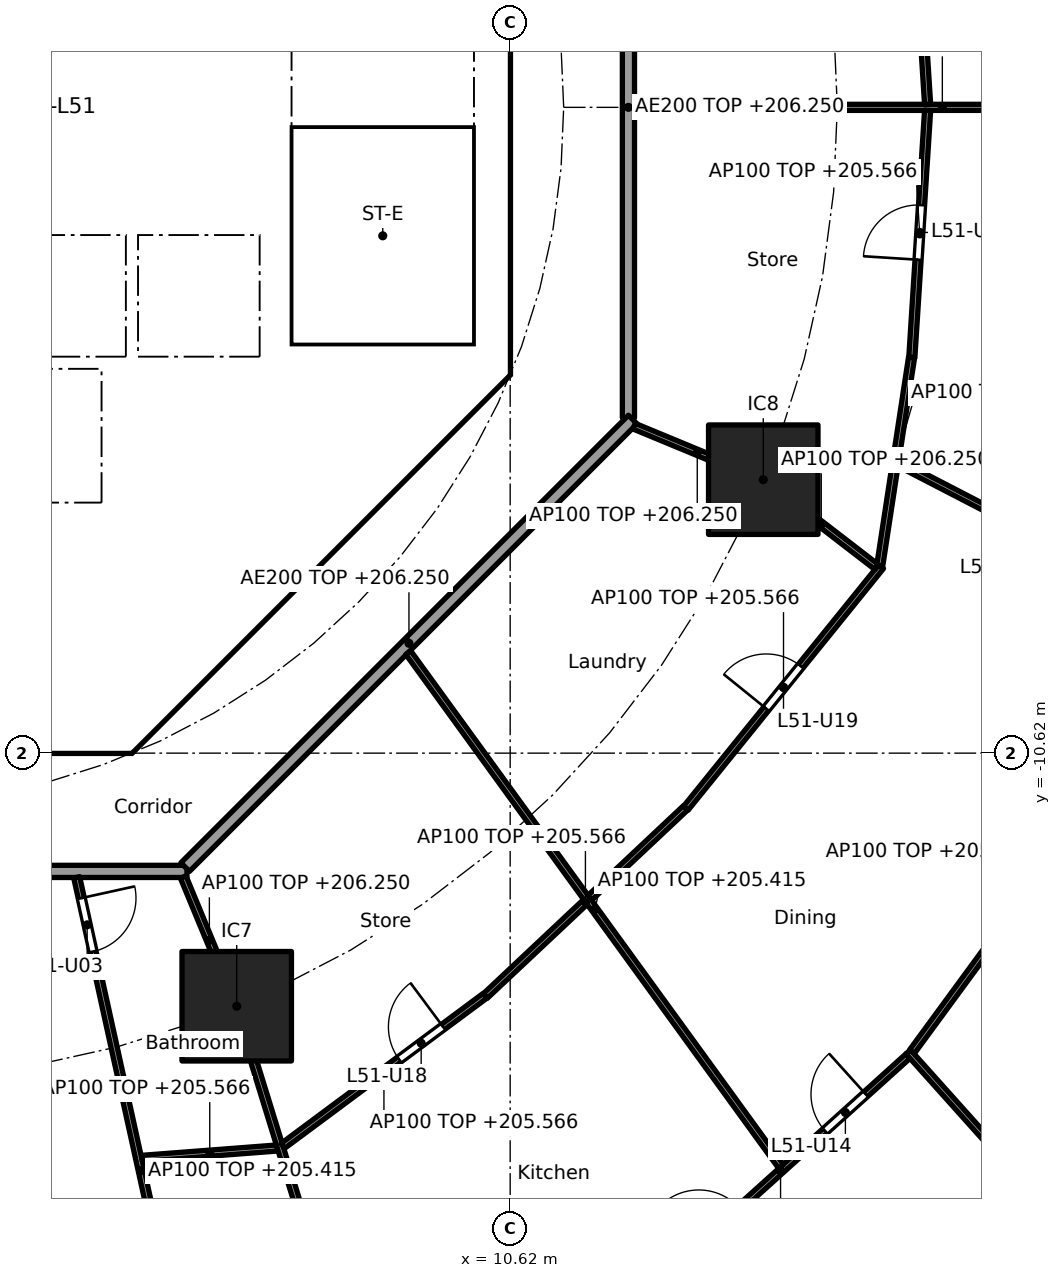
"""IFC4 building model, lengths in metres.
Left out: names, types, materials, properties, quantities, classifications, styles, units other than length and angle.
Written with IfcOpenShell. Run it as: python <this file> out.ifc"""

import sys

from ifc_helpers import new_model, si_unit, direction, frame, frame_2d, origin, origin_2d, place, context, subcontext, project, spatial, polyline, rectangle, outline, extrude, element, fill, save


model = new_model("IFC4")
c1 = context("Model", 3, precision=1e-05, world=origin(), true_north=direction((0.0, 1.0)))
c2 = subcontext(c1, "Body", "Model", "MODEL_VIEW")
j1 = project(units=[si_unit("LENGTHUNIT", "METRE"), si_unit("PLANEANGLEUNIT", "RADIAN")], contexts=[c1])
p1 = place(None, origin())
s1 = spatial("IfcSite", under=j1, at=p1, CompositionType="ELEMENT")
p2 = place(p1, origin())
s2 = spatial("IfcBuilding", under=s1, at=p2, CompositionType="ELEMENT")
p3 = place(p2, frame((0.0, 0.0, 202.9)))
s3 = spatial("IfcBuildingStorey", under=s2, at=p3, CompositionType="ELEMENT", Elevation=202.9)
for number, where, z_axis, x_axis in (
    (1, (6.123, -14.782, 0.0), (0.0, 0.0, 1.0), (1.0, 0.0, 0.0)),
    (2, (14.782, -6.123, 0.0), (0.0, 0.0, 1.0), (1.0, 0.0, 0.0)),
):
    element("IfcColumn", number, at=place(p3, frame(where, z_axis=z_axis, x_axis=x_axis)), inside=s3, PredefinedType="COLUMN", context=c2, shape_type="SweptSolid", body=[
        extrude(rectangle(XDim=1.8, YDim=1.8, at=origin_2d()), origin(), (0.0, 0.0, 1.0), 3.7),
    ])
p4 = place(p3, frame((4.613, -9.988, 0.0), z_axis=(0.0, 0.0, 1.0), x_axis=(0.707106781187, 0.707106781187, 0.0)))
e3 = element("IfcWall", 3, at=p4, inside=s3, PredefinedType="SHEAR", context=c2, shape_type="SweptSolid", body=[
    extrude(rectangle(XDim=7.602, YDim=0.6, at=frame_2d((3.801, 0.0))), origin(), (0.0, 0.0, 1.0), 3.35),
])
p5 = place(p4, frame((3.201, 0.0, 0.0)))
e4 = element("IfcOpeningElement", 4, at=p5, cuts=e3, PredefinedType="OPENING", context=c2, shape_type="SweptSolid", body=[
    extrude(rectangle(XDim=1.2, YDim=2.1, at=frame_2d((0.6, 1.05))), frame((0.0, 0.31, 0.0), z_axis=(0.0, -1.0, 0.0), x_axis=(1.0, 0.0, 0.0)), (0.0, 0.0, 1.0), 0.62),
])
p6 = place(p3, frame((4.0, -10.025, 0.0), z_axis=(0.0, 0.0, 1.0), x_axis=(0.0, 1.0, 0.0)))
e5 = element("IfcWall", 5, at=p6, inside=s3, PredefinedType="SOLIDWALL", context=c2, shape_type="SweptSolid", body=[
    extrude(rectangle(XDim=3.0, YDim=0.2, at=frame_2d((1.5, 0.0))), origin(), (0.0, 0.0, 1.0), 3.35),
])
p7 = place(p6, frame((0.975, 0.0, 0.0)))
e6 = element("IfcOpeningElement", 6, at=p7, cuts=e5, PredefinedType="OPENING", context=c2, shape_type="SweptSolid", body=[
    extrude(rectangle(XDim=1.1, YDim=2.1, at=frame_2d((0.55, 1.05))), frame((0.0, 0.11, 0.0), z_axis=(0.0, -1.0, 0.0), x_axis=(1.0, 0.0, 0.0)), (0.0, 0.0, 1.0), 0.22),
])
p8 = place(p3, frame((4.0, -6.5, 0.0), z_axis=(0.0, 0.0, 1.0), x_axis=(0.0, 1.0, 0.0)))
e7 = element("IfcWall", 7, at=p8, inside=s3, PredefinedType="SOLIDWALL", context=c2, shape_type="SweptSolid", body=[
    extrude(rectangle(XDim=2.2, YDim=0.2, at=frame_2d((1.1, 0.0))), origin(), (0.0, 0.0, 1.0), 3.35),
])
p9 = place(p8, frame((0.55, 0.0, 0.0)))
e8 = element("IfcOpeningElement", 8, at=p9, cuts=e7, PredefinedType="OPENING", context=c2, shape_type="SweptSolid", body=[
    extrude(rectangle(XDim=1.1, YDim=2.1, at=frame_2d((0.55, 1.05))), frame((0.0, 0.11, 0.0), z_axis=(0.0, -1.0, 0.0), x_axis=(1.0, 0.0, 0.0)), (0.0, 0.0, 1.0), 0.22),
])
p10 = place(p3, frame((-6.7, -2.0, 0.0), z_axis=(0.0, 0.0, 1.0), x_axis=(1.0, 0.0, 0.0)))
e9 = element("IfcWall", 9, at=p10, inside=s3, PredefinedType="SOLIDWALL", context=c2, shape_type="SweptSolid", body=[
    extrude(rectangle(XDim=13.4, YDim=0.2, at=frame_2d((6.7, 0.0))), origin(), (0.0, 0.0, 1.0), 3.35),
])
p11 = place(p10, frame((5.05, 0.0, 0.0)))
e10 = element("IfcOpeningElement", 10, at=p11, cuts=e9, PredefinedType="OPENING", context=c2, shape_type="SweptSolid", body=[
    extrude(rectangle(XDim=1.1, YDim=2.1, at=frame_2d((0.55, 1.05))), frame((0.0, 0.11, 0.0), z_axis=(0.0, -1.0, 0.0), x_axis=(1.0, 0.0, 0.0)), (0.0, 0.0, 1.0), 0.22),
])
p12 = place(p10, frame((7.25, 0.0, 0.0)))
e11 = element("IfcOpeningElement", 11, at=p12, cuts=e9, PredefinedType="OPENING", context=c2, shape_type="SweptSolid", body=[
    extrude(rectangle(XDim=1.1, YDim=2.1, at=frame_2d((0.55, 1.05))), frame((0.0, 0.11, 0.0), z_axis=(0.0, -1.0, 0.0), x_axis=(1.0, 0.0, 0.0)), (0.0, 0.0, 1.0), 0.22),
])
p13 = place(p10, frame((0.75, 0.0, 0.0)))
e12 = element("IfcOpeningElement", 12, at=p13, cuts=e9, PredefinedType="OPENING", context=c2, shape_type="SweptSolid", body=[
    extrude(rectangle(XDim=0.9, YDim=2.1, at=frame_2d((0.45, 1.05))), frame((0.0, 0.11, 0.0), z_axis=(0.0, -1.0, 0.0), x_axis=(1.0, 0.0, 0.0)), (0.0, 0.0, 1.0), 0.22),
])
p14 = place(p10, frame((2.95, 0.0, 0.0)))
e13 = element("IfcOpeningElement", 13, at=p14, cuts=e9, PredefinedType="OPENING", context=c2, shape_type="SweptSolid", body=[
    extrude(rectangle(XDim=0.9, YDim=2.1, at=frame_2d((0.45, 1.05))), frame((0.0, 0.11, 0.0), z_axis=(0.0, -1.0, 0.0), x_axis=(1.0, 0.0, 0.0)), (0.0, 0.0, 1.0), 0.22),
])
p15 = place(p3, origin())
e14 = element("IfcWall", 14, at=p15, inside=s3, PredefinedType="SHEAR", context=c2, shape_type="SweptSolid", body=[
    extrude(outline(polyline([(-4.152, -10.025), (4.152, -10.025), (4.401, -9.776), (4.825, -10.2), (4.401, -10.625), (-4.401, -10.625), (-4.825, -10.2), (-4.401, -9.776), (-4.152, -10.025)])), origin(), (0.0, 0.0, 1.0), 3.35),
])
p16 = place(p3, origin())
e15 = element("IfcWall", 15, at=p16, inside=s3, PredefinedType="SHEAR", context=c2, shape_type="SweptSolid", body=[
    extrude(outline(polyline([(9.776, -4.401), (10.025, -4.152), (10.025, -3.801), (10.025, 4.152), (9.776, 4.401), (10.2, 4.825), (10.625, 4.401), (10.625, -4.401), (10.2, -4.825), (9.776, -4.401)])), origin(), (0.0, 0.0, 1.0), 3.35),
])
p17 = place(p3, origin())
e16 = element("IfcWall", 16, at=p17, inside=s3, PredefinedType="SOLIDWALL", context=c2, shape_type="SweptSolid", body=[
    extrude(outline(polyline([(-6.7, -2.1), (-6.5, -2.1), (-6.5, -4.1), (-4.5, -4.1), (-4.5, -2.1), (-4.3, -2.1), (-4.3, -4.1), (-2.3, -4.1), (-2.3, -2.1), (-2.1, -2.1), (-2.1, -4.1), (-0.1, -4.1), (-0.1, -2.1), (0.1, -2.1), (0.1, -4.1), (2.1, -4.1), (2.1, -2.1), (2.3, -2.1), (2.3, -4.1), (4.3, -4.1), (4.3, -2.1), (4.5, -2.1), (4.5, -4.1), (6.5, -4.1), (6.5, -2.1), (6.7, -2.1), (6.7, -4.3), (-6.7, -4.3), (-6.7, -2.1)])), origin(), (0.0, 0.0, 1.0), 3.35),
])
p18 = place(p3, origin())
e17 = element("IfcWall", 17, at=p18, inside=s3, PredefinedType="SOLIDWALL", context=c2, shape_type="SweptSolid", body=[
    extrude(outline(polyline([(4.1, -7.025), (-4.1, -7.025), (-4.1, -6.5), (4.1, -6.5), (4.1, -7.025)])), origin(), (0.0, 0.0, 1.0), 3.35),
])
p19 = place(p3, origin())
e18 = element("IfcWall", 18, at=p19, inside=s3, PredefinedType="SOLIDWALL", context=c2, shape_type="SweptSolid", body=[
    extrude(outline(polyline([(7.025, -3.9), (6.7, -3.9), (6.7, 3.9), (7.025, 3.9), (7.025, -3.9)])), origin(), (0.0, 0.0, 1.0), 3.35),
])
p20 = place(p3, origin())
e19 = element("IfcWall", 19, at=p20, inside=s3, PredefinedType="SOLIDWALL", context=c2, shape_type="SweptSolid", body=[
    extrude(outline(polyline([(10.025, -4.1), (6.7, -4.1), (6.7, -3.9), (10.025, -3.9), (10.025, -4.1)])), origin(), (0.0, 0.0, 1.0), 3.35),
])
p21 = place(p3, frame((12.565, -5.104, 0.0), z_axis=(0.0, 0.0, 1.0), x_axis=(0.0, 1.0, 0.0)))
e20 = element("IfcWall", 20, at=p21, inside=s3, PredefinedType="PARTITIONING", context=c2, shape_type="SweptSolid", body=[
    extrude(rectangle(XDim=10.209, YDim=0.2, at=frame_2d((5.104, 0.0))), origin(), (0.0, 0.0, 1.0), 3.35),
])
p22 = place(p3, frame((-5.104, -12.565, 0.0), z_axis=(0.0, 0.0, 1.0), x_axis=(1.0, 0.0, 0.0)))
e21 = element("IfcWall", 21, at=p22, inside=s3, PredefinedType="PARTITIONING", context=c2, shape_type="SweptSolid", body=[
    extrude(rectangle(XDim=10.409, YDim=0.2, at=frame_2d((5.205, 0.0))), origin(), (0.0, 0.0, 1.0), 3.35),
])
p23 = place(p22, frame((6.339, 0.0, 0.0)))
e22 = element("IfcOpeningElement", 22, at=p23, cuts=e21, PredefinedType="OPENING", context=c2, shape_type="SweptSolid", body=[
    extrude(rectangle(XDim=1.0, YDim=2.1, at=frame_2d((0.5, 1.05))), frame((0.0, 0.11, 0.0), z_axis=(0.0, -1.0, 0.0), x_axis=(1.0, 0.0, 0.0)), (0.0, 0.0, 1.0), 0.22),
])
p24 = place(p3, frame((5.275, -12.494, 0.0), z_axis=(0.0, 0.0, 1.0), x_axis=(0.707106781187, 0.707106781187, 0.0)))
e23 = element("IfcWall", 23, at=p24, inside=s3, PredefinedType="PARTITIONING", context=c2, shape_type="SweptSolid", body=[
    extrude(rectangle(XDim=10.409, YDim=0.2, at=frame_2d((5.205, 0.0))), origin(), (0.0, 0.0, 1.0), 3.35),
])
p25 = place(p3, frame((12.665, 0.0, 0.0), z_axis=(0.0, 0.0, 1.0), x_axis=(1.0, 0.0, 0.0)))
e24 = element("IfcWall", 24, at=p25, inside=s3, PredefinedType="PARTITIONING", context=c2, shape_type="SweptSolid", body=[
    extrude(rectangle(XDim=10.124, YDim=0.1, at=frame_2d((5.062, 0.0))), origin(), (0.0, 0.0, 1.0), 2.515),
])
p26 = place(p3, frame((17.485, 0.05, 0.0), z_axis=(0.0, 0.0, 1.0), x_axis=(-0.063673473968, 0.997970785501, 0.0)))
e25 = element("IfcWall", 25, at=p26, inside=s3, PredefinedType="PARTITIONING", context=c2, shape_type="SweptSolid", body=[
    extrude(rectangle(XDim=4.072, YDim=0.1, at=frame_2d((2.036, 0.0))), origin(), (0.0, 0.0, 1.0), 2.666),
])
p27 = place(p26, frame((1.561, 0.0, 0.0)))
e26 = element("IfcOpeningElement", 26, at=p27, cuts=e25, PredefinedType="OPENING", context=c2, shape_type="SweptSolid", body=[
    extrude(rectangle(XDim=0.9, YDim=2.1, at=frame_2d((0.45, 1.05))), frame((0.0, 0.06, 0.0), z_axis=(0.0, -1.0, 0.0), x_axis=(1.0, 0.0, 0.0)), (0.0, 0.0, 1.0), 0.12),
])
p28 = place(p3, frame((17.485, -0.05, 0.0), z_axis=(0.0, 0.0, 1.0), x_axis=(-0.063673473968, -0.997970785501, 0.0)))
e27 = element("IfcWall", 27, at=p28, inside=s3, PredefinedType="PARTITIONING", context=c2, shape_type="SweptSolid", body=[
    extrude(rectangle(XDim=4.072, YDim=0.1, at=frame_2d((2.036, 0.0))), origin(), (0.0, 0.0, 1.0), 2.666),
])
p29 = place(p28, frame((1.561, 0.0, 0.0)))
e28 = element("IfcOpeningElement", 28, at=p29, cuts=e27, PredefinedType="OPENING", context=c2, shape_type="SweptSolid", body=[
    extrude(rectangle(XDim=0.9, YDim=2.1, at=frame_2d((0.45, 1.05))), frame((0.0, 0.06, 0.0), z_axis=(0.0, -1.0, 0.0), x_axis=(1.0, 0.0, 0.0)), (0.0, 0.0, 1.0), 0.12),
])
p30 = place(p3, frame((3.491, -12.662, 0.0), z_axis=(0.0, 0.0, 1.0), x_axis=(0.215082442833, -0.976595895335, 0.0)))
e29 = element("IfcWall", 29, at=p30, inside=s3, PredefinedType="PARTITIONING", context=c2, shape_type="SweptSolid", body=[
    extrude(rectangle(XDim=9.878, YDim=0.1, at=frame_2d((4.939, 0.0))), origin(), (0.0, 0.0, 1.0), 2.515),
])
p31 = place(p30, frame((0.35, 0.0, 0.0)))
e30 = element("IfcOpeningElement", 30, at=p31, cuts=e29, PredefinedType="OPENING", context=c2, shape_type="SweptSolid", body=[
    extrude(rectangle(XDim=0.9, YDim=2.1, at=frame_2d((0.45, 1.05))), frame((0.0, 0.06, 0.0), z_axis=(0.0, -1.0, 0.0), x_axis=(1.0, 0.0, 0.0)), (0.0, 0.0, 1.0), 0.12),
])
p32 = place(p30, frame((6.861, 0.0, 0.0)))
e31 = element("IfcOpeningElement", 31, at=p32, cuts=e29, PredefinedType="OPENING", context=c2, shape_type="SweptSolid", body=[
    extrude(rectangle(XDim=0.9, YDim=2.1, at=frame_2d((0.45, 1.05))), frame((0.0, 0.06, 0.0), z_axis=(0.0, -1.0, 0.0), x_axis=(1.0, 0.0, 0.0)), (0.0, 0.0, 1.0), 0.12),
])
p33 = place(p3, frame((4.568, -17.284, 0.0), z_axis=(0.0, 0.0, 1.0), x_axis=(0.997076339393, 0.076411867029, 0.0)))
e32 = element("IfcWall", 32, at=p33, inside=s3, PredefinedType="PARTITIONING", context=c2, shape_type="SweptSolid", body=[
    extrude(rectangle(XDim=2.23, YDim=0.1, at=frame_2d((1.115, 0.0))), origin(), (0.0, 0.0, 1.0), 2.666),
])
p34 = place(p3, frame((5.243, -12.657, 0.0), z_axis=(0.0, 0.0, 1.0), x_axis=(0.382719158442, -0.923864733477, 0.0)))
e33 = element("IfcWall", 33, at=p34, inside=s3, PredefinedType="PARTITIONING", context=c2, shape_type="SweptSolid", body=[
    extrude(rectangle(XDim=2.25, YDim=0.1, at=frame_2d((1.125, 0.0))), origin(), (0.0, 0.0, 1.0), 3.35),
])
p35 = place(p3, frame((6.138, -14.83, 0.0), z_axis=(0.0, 0.0, 1.0), x_axis=(0.294822274121, -0.955552105687, 0.0)))
e34 = element("IfcWall", 34, at=p35, inside=s3, PredefinedType="PARTITIONING", context=c2, shape_type="SweptSolid", body=[
    extrude(rectangle(XDim=7.594, YDim=0.1, at=frame_2d((3.797, 0.0))), origin(), (0.0, 0.0, 1.0), 3.35),
])
p36 = place(p3, frame((6.881, -17.08, 0.0), z_axis=(0.0, 0.0, 1.0), x_axis=(0.802784956441, 0.596268659005, 0.0)))
e35 = element("IfcWall", 35, at=p36, inside=s3, PredefinedType="PARTITIONING", context=c2, shape_type="SweptSolid", body=[
    extrude(rectangle(XDim=4.142, YDim=0.1, at=frame_2d((2.071, 0.0))), origin(), (0.0, 0.0, 1.0), 2.666),
])
p37 = place(p36, frame((2.384, 0.0, 0.0)))
e36 = element("IfcOpeningElement", 36, at=p37, cuts=e35, PredefinedType="OPENING", context=c2, shape_type="SweptSolid", body=[
    extrude(rectangle(XDim=0.9, YDim=2.1, at=frame_2d((0.45, 1.05))), frame((0.0, 0.06, 0.0), z_axis=(0.0, -1.0, 0.0), x_axis=(1.0, 0.0, 0.0)), (0.0, 0.0, 1.0), 0.12),
])
p38 = place(p3, frame((10.21, -14.614, 0.0), z_axis=(0.0, 0.0, 1.0), x_axis=(0.728883199496, 0.684638066055, 0.0)))
e37 = element("IfcWall", 37, at=p38, inside=s3, PredefinedType="PARTITIONING", context=c2, shape_type="SweptSolid", body=[
    extrude(rectangle(XDim=4.519, YDim=0.1, at=frame_2d((2.26, 0.0))), origin(), (0.0, 0.0, 1.0), 2.666),
])
p39 = place(p3, frame((12.971, -19.38, 0.0), z_axis=(0.0, 0.0, 1.0), x_axis=(0.742768881471, 0.669547898748, 0.0)))
e38 = element("IfcWall", 38, at=p39, inside=s3, PredefinedType="PARTITIONING", context=c2, shape_type="SweptSolid", body=[
    extrude(rectangle(XDim=5.642, YDim=0.1, at=frame_2d((2.821, 0.0))), origin(), (0.0, 0.0, 1.0), 2.666),
])
p40 = place(p39, frame((1.01, 0.0, 0.0)))
e39 = element("IfcOpeningElement", 39, at=p40, cuts=e38, PredefinedType="OPENING", context=c2, shape_type="SweptSolid", body=[
    extrude(rectangle(XDim=0.9, YDim=2.1, at=frame_2d((0.45, 1.05))), frame((0.0, 0.06, 0.0), z_axis=(0.0, -1.0, 0.0), x_axis=(1.0, 0.0, 0.0)), (0.0, 0.0, 1.0), 0.12),
])
p41 = place(p39, frame((3.806, 0.0, 0.0)))
e40 = element("IfcOpeningElement", 40, at=p41, cuts=e38, PredefinedType="OPENING", context=c2, shape_type="SweptSolid", body=[
    extrude(rectangle(XDim=0.9, YDim=2.1, at=frame_2d((0.45, 1.05))), frame((0.0, 0.06, 0.0), z_axis=(0.0, -1.0, 0.0), x_axis=(1.0, 0.0, 0.0)), (0.0, 0.0, 1.0), 0.12),
])
p42 = place(p3, frame((8.943, -8.966, 0.0), z_axis=(0.0, 0.0, 1.0), x_axis=(0.587181355751, -0.809455406714, 0.0)))
e41 = element("IfcWall", 41, at=p42, inside=s3, PredefinedType="PARTITIONING", context=c2, shape_type="SweptSolid", body=[
    extrude(rectangle(XDim=10.441, YDim=0.1, at=frame_2d((5.221, 0.0))), origin(), (0.0, 0.0, 1.0), 2.515),
])
p43 = place(p3, frame((13.509, -11.525, 0.0), z_axis=(0.0, 0.0, 1.0), x_axis=(0.628778729481, 0.777584277974, 0.0)))
e42 = element("IfcWall", 42, at=p43, inside=s3, PredefinedType="PARTITIONING", context=c2, shape_type="SweptSolid", body=[
    extrude(rectangle(XDim=5.107, YDim=0.1, at=frame_2d((2.554, 0.0))), origin(), (0.0, 0.0, 1.0), 2.666),
])
p44 = place(p43, frame((2.104, 0.0, 0.0)))
e43 = element("IfcOpeningElement", 43, at=p44, cuts=e42, PredefinedType="OPENING", context=c2, shape_type="SweptSolid", body=[
    extrude(rectangle(XDim=0.9, YDim=2.1, at=frame_2d((0.45, 1.05))), frame((0.0, 0.06, 0.0), z_axis=(0.0, -1.0, 0.0), x_axis=(1.0, 0.0, 0.0)), (0.0, 0.0, 1.0), 0.12),
])
p45 = place(p3, frame((17.166, -15.532, 0.0), z_axis=(0.0, 0.0, 1.0), x_axis=(0.66728415915, -0.744803229684, 0.0)))
e44 = element("IfcWall", 44, at=p45, inside=s3, PredefinedType="PARTITIONING", context=c2, shape_type="SweptSolid", body=[
    extrude(rectangle(XDim=5.511, YDim=0.1, at=frame_2d((2.756, 0.0))), origin(), (0.0, 0.0, 1.0), 2.666),
])
p46 = place(p45, frame((2.331, 0.0, 0.0)))
e45 = element("IfcOpeningElement", 45, at=p46, cuts=e44, PredefinedType="OPENING", context=c2, shape_type="SweptSolid", body=[
    extrude(rectangle(XDim=0.9, YDim=2.1, at=frame_2d((0.45, 1.05))), frame((0.0, 0.06, 0.0), z_axis=(0.0, -1.0, 0.0), x_axis=(1.0, 0.0, 0.0)), (0.0, 0.0, 1.0), 0.12),
])
p47 = place(p3, frame((17.229, -15.529, 0.0), z_axis=(0.0, 0.0, 1.0), x_axis=(0.591117075283, 0.806585769345, 0.0)))
e46 = element("IfcWall", 46, at=p47, inside=s3, PredefinedType="PARTITIONING", context=c2, shape_type="SweptSolid", body=[
    extrude(rectangle(XDim=6.01, YDim=0.1, at=frame_2d((3.005, 0.0))), origin(), (0.0, 0.0, 1.0), 2.666),
])
p48 = place(p3, frame((12.657, -5.243, 0.0), z_axis=(0.0, 0.0, 1.0), x_axis=(0.923826362943, -0.382811769845, 0.0)))
e47 = element("IfcWall", 47, at=p48, inside=s3, PredefinedType="PARTITIONING", context=c2, shape_type="SweptSolid", body=[
    extrude(rectangle(XDim=2.25, YDim=0.1, at=frame_2d((1.125, 0.0))), origin(), (0.0, 0.0, 1.0), 3.35),
])
p49 = place(p3, frame((14.822, -6.154, 0.0), z_axis=(0.0, 0.0, 1.0), x_axis=(0.792226528082, -0.610227111987, 0.0)))
e48 = element("IfcWall", 48, at=p49, inside=s3, PredefinedType="PARTITIONING", context=c2, shape_type="SweptSolid", body=[
    extrude(rectangle(XDim=2.307, YDim=0.1, at=frame_2d((1.154, 0.0))), origin(), (0.0, 0.0, 1.0), 3.35),
])
p50 = place(p3, frame((16.697, -7.543, 0.0), z_axis=(0.0, 0.0, 1.0), x_axis=(0.151078880423, 0.988521710379, 0.0)))
e49 = element("IfcWall", 49, at=p50, inside=s3, PredefinedType="PARTITIONING", context=c2, shape_type="SweptSolid", body=[
    extrude(rectangle(XDim=3.469, YDim=0.1, at=frame_2d((1.735, 0.0))), origin(), (0.0, 0.0, 1.0), 2.666),
])
p51 = place(p3, frame((17.003, -5.851, 0.0), z_axis=(0.0, 0.0, 1.0), x_axis=(0.888005628038, -0.4598325832, 0.0)))
e50 = element("IfcWall", 50, at=p51, inside=s3, PredefinedType="PARTITIONING", context=c2, shape_type="SweptSolid", body=[
    extrude(rectangle(XDim=11.266, YDim=0.1, at=frame_2d((5.633, 0.0))), origin(), (0.0, 0.0, 1.0), 2.747),
])
p52 = place(p51, frame((7.703, 0.0, 0.0)))
e51 = element("IfcOpeningElement", 51, at=p52, cuts=e50, PredefinedType="OPENING", context=c2, shape_type="SweptSolid", body=[
    extrude(rectangle(XDim=0.9, YDim=2.1, at=frame_2d((0.45, 1.05))), frame((0.0, 0.06, 0.0), z_axis=(0.0, -1.0, 0.0), x_axis=(1.0, 0.0, 0.0)), (0.0, 0.0, 1.0), 0.12),
])
p53 = place(p51, frame((2.07, 0.0, 0.0)))
e52 = element("IfcOpeningElement", 52, at=p53, cuts=e50, PredefinedType="OPENING", context=c2, shape_type="SweptSolid", body=[
    extrude(rectangle(XDim=0.9, YDim=2.1, at=frame_2d((0.45, 1.05))), frame((0.0, 0.06, 0.0), z_axis=(0.0, -1.0, 0.0), x_axis=(1.0, 0.0, 0.0)), (0.0, 0.0, 1.0), 0.12),
])
p54 = place(p9, origin())
e53 = element("IfcDoor", 53, at=p54, inside=s3, OperationType="DOUBLE_DOOR_SLIDING", PredefinedType="DOOR", context=c2, shape_type="SweptSolid", body=[
    extrude(rectangle(XDim=1.1, YDim=2.1, at=frame_2d((0.55, 1.05))), frame((0.0, 0.025, 0.0), z_axis=(0.0, -1.0, 0.0), x_axis=(1.0, 0.0, 0.0)), (0.0, 0.0, 1.0), 0.05),
])
fill(e8, e53)
p55 = place(p7, origin())
e54 = element("IfcDoor", 54, at=p55, inside=s3, OperationType="SINGLE_SWING_RIGHT", PredefinedType="DOOR", context=c2, shape_type="SweptSolid", body=[
    extrude(rectangle(XDim=1.1, YDim=2.1, at=frame_2d((0.55, 1.05))), frame((0.0, 0.025, 0.0), z_axis=(0.0, -1.0, 0.0), x_axis=(1.0, 0.0, 0.0)), (0.0, 0.0, 1.0), 0.05),
])
fill(e6, e54)
p56 = place(p5, origin())
e55 = element("IfcDoor", 55, at=p56, inside=s3, OperationType="SINGLE_SWING_RIGHT", PredefinedType="DOOR", context=c2, shape_type="SweptSolid", body=[
    extrude(rectangle(XDim=1.2, YDim=2.1, at=frame_2d((0.6, 1.05))), frame((0.0, 0.025, 0.0), z_axis=(0.0, -1.0, 0.0), x_axis=(1.0, 0.0, 0.0)), (0.0, 0.0, 1.0), 0.05),
])
fill(e4, e55)
p57 = place(p31, origin())
e56 = element("IfcDoor", 56, at=p57, inside=s3, OperationType="SINGLE_SWING_LEFT", PredefinedType="DOOR", context=c2, shape_type="SweptSolid", body=[
    extrude(rectangle(XDim=0.9, YDim=2.1, at=frame_2d((0.45, 1.05))), frame((0.0, 0.025, 0.0), z_axis=(0.0, -1.0, 0.0), x_axis=(1.0, 0.0, 0.0)), (0.0, 0.0, 1.0), 0.05),
])
fill(e30, e56)
p58 = place(p41, origin())
e57 = element("IfcDoor", 57, at=p58, inside=s3, OperationType="SINGLE_SWING_RIGHT", PredefinedType="DOOR", context=c2, shape_type="SweptSolid", body=[
    extrude(rectangle(XDim=0.9, YDim=2.1, at=frame_2d((0.45, 1.05))), frame((0.0, 0.025, 0.0), z_axis=(0.0, -1.0, 0.0), x_axis=(1.0, 0.0, 0.0)), (0.0, 0.0, 1.0), 0.05),
])
fill(e40, e57)
p59 = place(p37, origin())
e58 = element("IfcDoor", 58, at=p59, inside=s3, OperationType="SINGLE_SWING_RIGHT", PredefinedType="DOOR", context=c2, shape_type="SweptSolid", body=[
    extrude(rectangle(XDim=0.9, YDim=2.1, at=frame_2d((0.45, 1.05))), frame((0.0, 0.025, 0.0), z_axis=(0.0, -1.0, 0.0), x_axis=(1.0, 0.0, 0.0)), (0.0, 0.0, 1.0), 0.05),
])
fill(e36, e58)
p60 = place(p44, origin())
e59 = element("IfcDoor", 59, at=p60, inside=s3, OperationType="SINGLE_SWING_LEFT", PredefinedType="DOOR", context=c2, shape_type="SweptSolid", body=[
    extrude(rectangle(XDim=0.9, YDim=2.1, at=frame_2d((0.45, 1.05))), frame((0.0, 0.025, 0.0), z_axis=(0.0, -1.0, 0.0), x_axis=(1.0, 0.0, 0.0)), (0.0, 0.0, 1.0), 0.05),
])
fill(e43, e59)
p61 = place(p29, frame((0.9, 0.0, 0.0), x_axis=(-1.0, 0.0, 0.0)))
e60 = element("IfcDoor", 60, at=p61, inside=s3, OperationType="SINGLE_SWING_LEFT", PredefinedType="DOOR", context=c2, shape_type="SweptSolid", body=[
    extrude(rectangle(XDim=0.9, YDim=2.1, at=frame_2d((0.45, 1.05))), frame((0.0, 0.025, 0.0), z_axis=(0.0, -1.0, 0.0), x_axis=(1.0, 0.0, 0.0)), (0.0, 0.0, 1.0), 0.05),
])
fill(e28, e60)
save(model, sys.argv[1])
